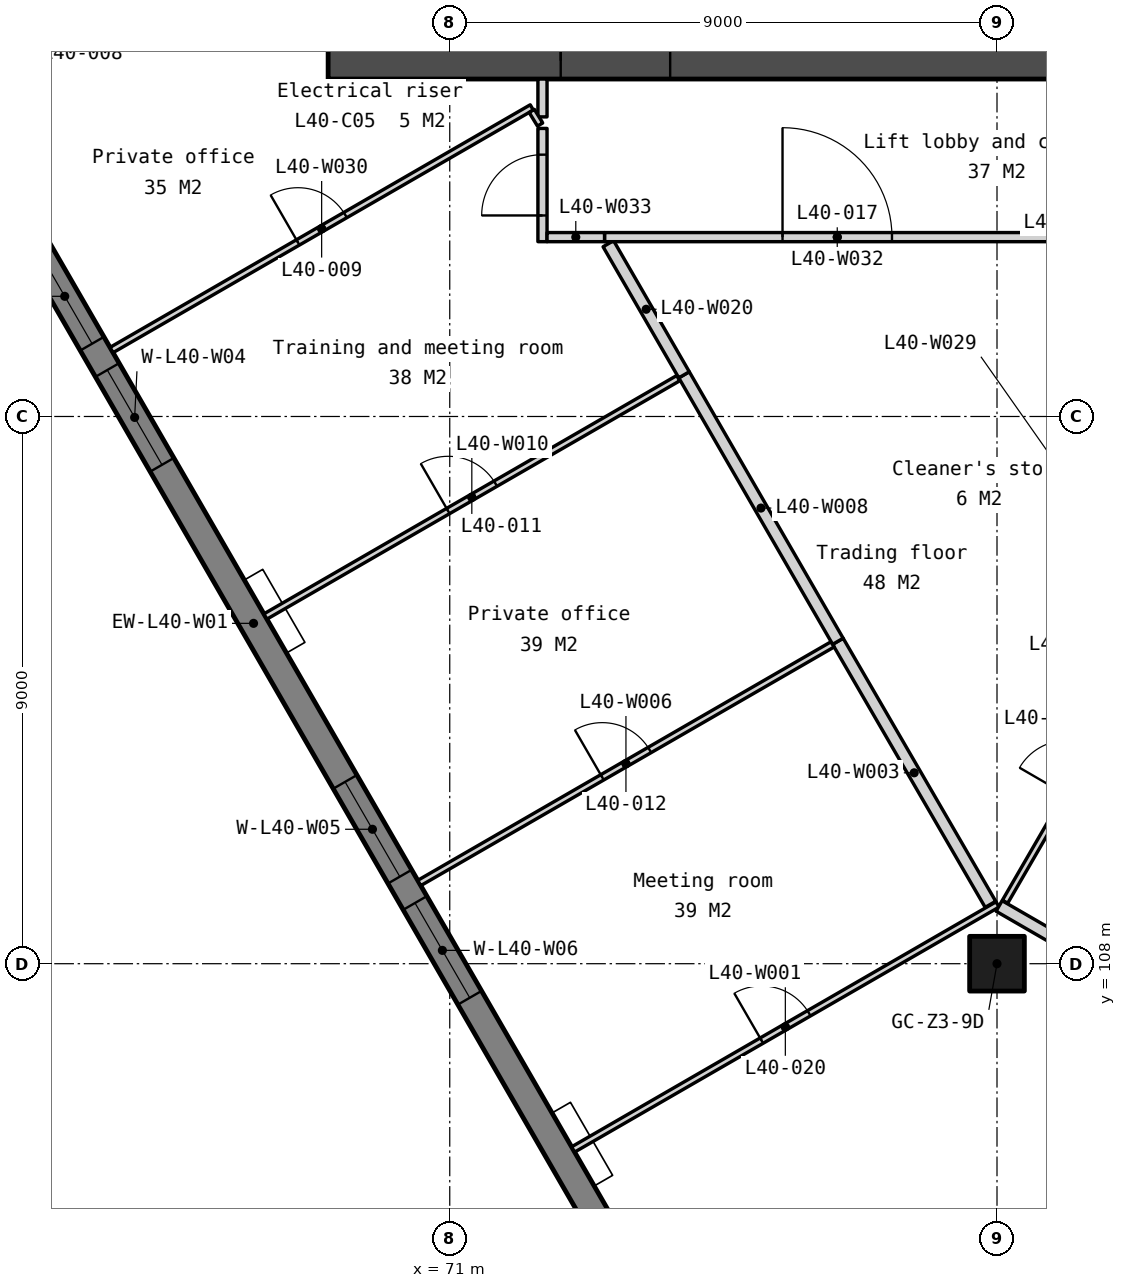
"""IFC4 building model, lengths in metres.
Left out: names, types, materials, properties, quantities, classifications, styles, units other than length and angle.
Written with IfcOpenShell. Run it as: python <this file> out.ifc"""

import sys

from ifc_helpers import new_model, si_unit, direction, frame, frame_2d, origin, origin_2d, place, context, subcontext, project, spatial, polyline, rectangle, outline, extrude, element, fill, save


model = new_model("IFC4")
c1 = context("Model", 3, precision=1e-05, world=origin(), true_north=direction((0.0, 1.0)))
c2 = subcontext(c1, "Body", "Model", "MODEL_VIEW")
j1 = project(units=[si_unit("LENGTHUNIT", "METRE"), si_unit("PLANEANGLEUNIT", "RADIAN")], contexts=[c1])
p1 = place(None, origin())
s1 = spatial("IfcSite", under=j1, at=p1, CompositionType="ELEMENT")
p2 = place(p1, origin())
s2 = spatial("IfcBuilding", under=s1, at=p2, CompositionType="ELEMENT")
p3 = place(p2, frame((0.0, 0.0, 159.8)))
s3 = spatial("IfcBuildingStorey", under=s2, at=p3, CompositionType="ELEMENT", Elevation=159.8)
p4 = place(p3, frame((80.0, 108.0, 0.0), z_axis=(0.0, 0.0, 1.0), x_axis=(1.0, 0.0, 0.0)))
e1 = element("IfcColumn", 1, at=p4, inside=s3, PredefinedType="COLUMN", context=c2, shape_type="SweptSolid", body=[
    extrude(rectangle(XDim=0.9, YDim=0.9, at=origin_2d()), origin(), (0.0, 0.0, 1.0), 3.9),
])
p5 = place(p3, frame((69.0, 122.85, 0.0), z_axis=(0.0, 0.0, 1.0), x_axis=(1.0, 0.0, 0.0)))
e2 = element("IfcWall", 2, at=p5, inside=s3, PredefinedType="SOLIDWALL", context=c2, shape_type="SweptSolid", body=[
    extrude(rectangle(XDim=22.0, YDim=0.6, at=frame_2d((11.0, 0.0))), origin(), (0.0, 0.0, 1.0), 3.75),
])
p6 = place(p5, frame((16.375, 0.0, 0.0)))
e3 = element("IfcOpeningElement", 3, at=p6, cuts=e2, PredefinedType="OPENING", context=c2, shape_type="SweptSolid", body=[
    extrude(rectangle(XDim=1.8, YDim=2.1, at=frame_2d((0.9, 1.05))), frame((0.0, 0.31, 0.0), z_axis=(0.0, -1.0, 0.0), x_axis=(1.0, 0.0, 0.0)), (0.0, 0.0, 1.0), 0.62),
])
p7 = place(p5, frame((3.825, 0.0, 0.0)))
e4 = element("IfcOpeningElement", 4, at=p7, cuts=e2, PredefinedType="OPENING", context=c2, shape_type="SweptSolid", body=[
    extrude(rectangle(XDim=1.8, YDim=2.1, at=frame_2d((0.9, 1.05))), frame((0.0, 0.31, 0.0), z_axis=(0.0, -1.0, 0.0), x_axis=(1.0, 0.0, 0.0)), (0.0, 0.0, 1.0), 0.62),
])
p8 = place(p5, frame((12.85, 0.0, 0.0)))
e5 = element("IfcOpeningElement", 5, at=p8, cuts=e2, PredefinedType="OPENING", context=c2, shape_type="SweptSolid", body=[
    extrude(rectangle(XDim=1.5, YDim=2.1, at=frame_2d((0.75, 1.05))), frame((0.0, 0.31, 0.0), z_axis=(0.0, -1.0, 0.0), x_axis=(1.0, 0.0, 0.0)), (0.0, 0.0, 1.0), 0.62),
])
p9 = place(p3, frame((57.652, 131.129, -0.15), z_axis=(0.0, 0.0, 1.0), x_axis=(0.499997369791, -0.866026922331, 0.0)))
e6 = element("IfcWall", 6, at=p9, inside=s3, PredefinedType="SOLIDWALL", context=c2, shape_type="SweptSolid", body=[
    extrude(outline(polyline([(40.486, 0.0), (40.486, 3.9), (0.0, 3.9), (0.0, 0.0), (40.486, 0.0)])), frame((0.0, 0.225, 0.0), z_axis=(0.0, -1.0, 0.0), x_axis=(1.0, 0.0, 0.0)), (0.0, 0.0, 1.0), 0.45),
])
p10 = place(p9, frame((3.011, 0.0, 0.95)))
e7 = element("IfcOpeningElement", 7, at=p10, cuts=e6, PredefinedType="OPENING", context=c2, shape_type="SweptSolid", body=[
    extrude(rectangle(XDim=1.8, YDim=2.2, at=frame_2d((0.9, 1.1))), frame((0.0, 0.235, 0.0), z_axis=(0.0, -1.0, 0.0), x_axis=(1.0, 0.0, 0.0)), (0.0, 0.0, 1.0), 0.47),
])
p11 = place(p9, frame((5.311, 0.0, 0.95)))
e8 = element("IfcOpeningElement", 8, at=p11, cuts=e6, PredefinedType="OPENING", context=c2, shape_type="SweptSolid", body=[
    extrude(rectangle(XDim=1.8, YDim=2.2, at=frame_2d((0.9, 1.1))), frame((0.0, 0.235, 0.0), z_axis=(0.0, -1.0, 0.0), x_axis=(1.0, 0.0, 0.0)), (0.0, 0.0, 1.0), 0.47),
])
p12 = place(p9, frame((13.132, 0.0, 0.95)))
e9 = element("IfcOpeningElement", 9, at=p12, cuts=e6, PredefinedType="OPENING", context=c2, shape_type="SweptSolid", body=[
    extrude(rectangle(XDim=1.8, YDim=2.2, at=frame_2d((0.9, 1.1))), frame((0.0, 0.235, 0.0), z_axis=(0.0, -1.0, 0.0), x_axis=(1.0, 0.0, 0.0)), (0.0, 0.0, 1.0), 0.47),
])
p13 = place(p9, frame((15.432, 0.0, 0.95)))
e10 = element("IfcOpeningElement", 10, at=p13, cuts=e6, PredefinedType="OPENING", context=c2, shape_type="SweptSolid", body=[
    extrude(rectangle(XDim=1.8, YDim=2.2, at=frame_2d((0.9, 1.1))), frame((0.0, 0.235, 0.0), z_axis=(0.0, -1.0, 0.0), x_axis=(1.0, 0.0, 0.0)), (0.0, 0.0, 1.0), 0.47),
])
p14 = place(p9, frame((23.254, 0.0, 0.95)))
e11 = element("IfcOpeningElement", 11, at=p14, cuts=e6, PredefinedType="OPENING", context=c2, shape_type="SweptSolid", body=[
    extrude(rectangle(XDim=1.8, YDim=2.2, at=frame_2d((0.9, 1.1))), frame((0.0, 0.235, 0.0), z_axis=(0.0, -1.0, 0.0), x_axis=(1.0, 0.0, 0.0)), (0.0, 0.0, 1.0), 0.47),
])
p15 = place(p9, frame((25.554, 0.0, 0.95)))
e12 = element("IfcOpeningElement", 12, at=p15, cuts=e6, PredefinedType="OPENING", context=c2, shape_type="SweptSolid", body=[
    extrude(rectangle(XDim=1.8, YDim=2.2, at=frame_2d((0.9, 1.1))), frame((0.0, 0.235, 0.0), z_axis=(0.0, -1.0, 0.0), x_axis=(1.0, 0.0, 0.0)), (0.0, 0.0, 1.0), 0.47),
])
p16 = place(p9, frame((33.375, 0.0, 0.95)))
e13 = element("IfcOpeningElement", 13, at=p16, cuts=e6, PredefinedType="OPENING", context=c2, shape_type="SweptSolid", body=[
    extrude(rectangle(XDim=1.8, YDim=2.2, at=frame_2d((0.9, 1.1))), frame((0.0, 0.235, 0.0), z_axis=(0.0, -1.0, 0.0), x_axis=(1.0, 0.0, 0.0)), (0.0, 0.0, 1.0), 0.47),
])
p17 = place(p9, frame((35.675, 0.0, 0.95)))
e14 = element("IfcOpeningElement", 14, at=p17, cuts=e6, PredefinedType="OPENING", context=c2, shape_type="SweptSolid", body=[
    extrude(rectangle(XDim=1.8, YDim=2.2, at=frame_2d((0.9, 1.1))), frame((0.0, 0.235, 0.0), z_axis=(0.0, -1.0, 0.0), x_axis=(1.0, 0.0, 0.0)), (0.0, 0.0, 1.0), 0.47),
])
p18 = place(p3, frame((73.029, 104.945, 0.0), z_axis=(0.0, 0.0, 1.0), x_axis=(0.866018113567, 0.500012626815, 0.0)))
e15 = element("IfcWall", 15, at=p18, inside=s3, PredefinedType="PARTITIONING", context=c2, shape_type="SweptSolid", body=[
    extrude(rectangle(XDim=8.06, YDim=0.1, at=frame_2d((4.03, 0.0))), origin(), (0.0, 0.0, 1.0), 3.75),
])
p19 = place(p18, frame((3.58, 0.0, 0.0)))
e16 = element("IfcOpeningElement", 16, at=p19, cuts=e15, PredefinedType="OPENING", context=c2, shape_type="SweptSolid", body=[
    extrude(rectangle(XDim=0.9, YDim=2.1, at=frame_2d((0.45, 1.05))), frame((0.0, 0.06, 0.0), z_axis=(0.0, -1.0, 0.0), x_axis=(1.0, 0.0, 0.0)), (0.0, 0.0, 1.0), 0.12),
])
p20 = place(p3, frame((77.384, 113.302, 0.0), z_axis=(0.0, 0.0, 1.0), x_axis=(0.501680827225, -0.865052800467, 0.0)))
e17 = element("IfcWall", 17, at=p20, inside=s3, PredefinedType="PARTITIONING", context=c2, shape_type="SweptSolid", body=[
    extrude(rectangle(XDim=5.001, YDim=0.2, at=frame_2d((2.5, 0.0))), origin(), (0.0, 0.0, 1.0), 3.75),
])
p21 = place(p3, frame((80.034, 108.95, 0.0), z_axis=(0.0, 0.0, 1.0), x_axis=(0.866028745538, -0.499994211868, 0.0)))
e18 = element("IfcWall", 18, at=p21, inside=s3, PredefinedType="PARTITIONING", context=c2, shape_type="SweptSolid", body=[
    extrude(rectangle(XDim=8.01, YDim=0.2, at=frame_2d((4.005, 0.0))), origin(), (0.0, 0.0, 1.0), 3.75),
])
p22 = place(p3, frame((70.499, 109.327, 0.0), z_axis=(0.0, 0.0, 1.0), x_axis=(0.86602399778, 0.500002435262, 0.0)))
e19 = element("IfcWall", 19, at=p22, inside=s3, PredefinedType="PARTITIONING", context=c2, shape_type="SweptSolid", body=[
    extrude(rectangle(XDim=7.85, YDim=0.1, at=frame_2d((3.925, 0.0))), origin(), (0.0, 0.0, 1.0), 3.75),
])
p23 = place(p22, frame((3.475, 0.0, 0.0)))
e20 = element("IfcOpeningElement", 20, at=p23, cuts=e19, PredefinedType="OPENING", context=c2, shape_type="SweptSolid", body=[
    extrude(rectangle(XDim=0.9, YDim=2.1, at=frame_2d((0.45, 1.05))), frame((0.0, 0.06, 0.0), z_axis=(0.0, -1.0, 0.0), x_axis=(1.0, 0.0, 0.0)), (0.0, 0.0, 1.0), 0.12),
])
p24 = place(p3, frame((74.853, 117.685, 0.0), z_axis=(0.0, 0.0, 1.0), x_axis=(0.500014760403, -0.866016881694, 0.0)))
e21 = element("IfcWall", 21, at=p24, inside=s3, PredefinedType="PARTITIONING", context=c2, shape_type="SweptSolid", body=[
    extrude(rectangle(XDim=5.061, YDim=0.2, at=frame_2d((2.53, 0.0))), origin(), (0.0, 0.0, 1.0), 3.75),
])
p25 = place(p3, frame((80.133, 109.02, 0.0), z_axis=(0.0, 0.0, 1.0), x_axis=(0.501726207978, 0.865026480651, 0.0)))
e22 = element("IfcWall", 22, at=p25, inside=s3, PredefinedType="PARTITIONING", context=c2, shape_type="SweptSolid", body=[
    extrude(rectangle(XDim=4.951, YDim=0.1, at=frame_2d((2.475, 0.0))), origin(), (0.0, 0.0, 1.0), 3.75),
])
p26 = place(p25, frame((2.025, 0.0, 0.0)))
e23 = element("IfcOpeningElement", 23, at=p26, cuts=e22, PredefinedType="OPENING", context=c2, shape_type="SweptSolid", body=[
    extrude(rectangle(XDim=0.9, YDim=2.1, at=frame_2d((0.45, 1.05))), frame((0.0, 0.06, 0.0), z_axis=(0.0, -1.0, 0.0), x_axis=(1.0, 0.0, 0.0)), (0.0, 0.0, 1.0), 0.12),
])
p27 = place(p3, frame((67.968, 113.71, 0.0), z_axis=(0.0, 0.0, 1.0), x_axis=(0.866013415921, 0.500020763015, 0.0)))
e24 = element("IfcWall", 24, at=p27, inside=s3, PredefinedType="PARTITIONING", context=c2, shape_type="SweptSolid", body=[
    extrude(rectangle(XDim=7.84, YDim=0.1, at=frame_2d((3.92, 0.0))), origin(), (0.0, 0.0, 1.0), 3.75),
])
p28 = place(p27, frame((3.47, 0.0, 0.0)))
e25 = element("IfcOpeningElement", 25, at=p28, cuts=e24, PredefinedType="OPENING", context=c2, shape_type="SweptSolid", body=[
    extrude(rectangle(XDim=0.9, YDim=2.1, at=frame_2d((0.45, 1.05))), frame((0.0, 0.06, 0.0), z_axis=(0.0, -1.0, 0.0), x_axis=(1.0, 0.0, 0.0)), (0.0, 0.0, 1.0), 0.12),
])
p29 = place(p3, frame((73.608, 119.842, 0.0), z_axis=(0.0, 0.0, 1.0), x_axis=(0.50001949124, -0.86601415022, 0.0)))
e26 = element("IfcWall", 26, at=p29, inside=s3, PredefinedType="PARTITIONING", context=c2, shape_type="SweptSolid", body=[
    extrude(rectangle(XDim=2.49, YDim=0.2, at=frame_2d((1.245, 0.0))), origin(), (0.0, 0.0, 1.0), 3.75),
])
p30 = place(p3, frame((65.438, 118.093, 0.0), z_axis=(0.0, 0.0, 1.0), x_axis=(0.866026120082, 0.499998759335, 0.0)))
e27 = element("IfcWall", 27, at=p30, inside=s3, PredefinedType="PARTITIONING", context=c2, shape_type="SweptSolid", body=[
    extrude(rectangle(XDim=7.98, YDim=0.1, at=frame_2d((3.99, 0.0))), origin(), (0.0, 0.0, 1.0), 3.75),
])
p31 = place(p30, frame((3.54, 0.0, 0.0)))
e28 = element("IfcOpeningElement", 28, at=p31, cuts=e27, PredefinedType="OPENING", context=c2, shape_type="SweptSolid", body=[
    extrude(rectangle(XDim=0.9, YDim=2.1, at=frame_2d((0.45, 1.05))), frame((0.0, 0.06, 0.0), z_axis=(0.0, -1.0, 0.0), x_axis=(1.0, 0.0, 0.0)), (0.0, 0.0, 1.0), 0.12),
])
p32 = place(p3, frame((72.525, 119.875, 0.0), z_axis=(0.0, 0.0, 1.0), x_axis=(0.0, 1.0, 0.0)))
e29 = element("IfcWall", 29, at=p32, inside=s3, PredefinedType="PARTITIONING", context=c2, shape_type="SweptSolid", body=[
    extrude(rectangle(XDim=1.863, YDim=0.15, at=frame_2d((0.931, 0.0))), origin(), (0.0, 0.0, 1.0), 3.75),
])
p33 = place(p32, frame((0.431, 0.0, 0.0)))
e30 = element("IfcOpeningElement", 30, at=p33, cuts=e29, PredefinedType="OPENING", context=c2, shape_type="SweptSolid", body=[
    extrude(rectangle(XDim=1.0, YDim=2.1, at=frame_2d((0.5, 1.05))), frame((0.0, 0.085, 0.0), z_axis=(0.0, -1.0, 0.0), x_axis=(1.0, 0.0, 0.0)), (0.0, 0.0, 1.0), 0.17),
])
p34 = place(p3, frame((73.545, 119.95, 0.0), z_axis=(0.0, 0.0, 1.0), x_axis=(1.0, 0.0, 0.0)))
e31 = element("IfcWall", 31, at=p34, inside=s3, PredefinedType="PARTITIONING", context=c2, shape_type="SweptSolid", body=[
    extrude(rectangle(XDim=7.655, YDim=0.15, at=frame_2d((3.827, 0.0))), origin(), (0.0, 0.0, 1.0), 3.75),
])
p35 = place(p34, frame((2.927, 0.0, 0.0)))
e32 = element("IfcOpeningElement", 32, at=p35, cuts=e31, PredefinedType="OPENING", context=c2, shape_type="SweptSolid", body=[
    extrude(rectangle(XDim=1.8, YDim=2.1, at=frame_2d((0.9, 1.05))), frame((0.0, 0.085, 0.0), z_axis=(0.0, -1.0, 0.0), x_axis=(1.0, 0.0, 0.0)), (0.0, 0.0, 1.0), 0.17),
])
p36 = place(p3, frame((72.6, 119.95, 0.0), z_axis=(0.0, 0.0, 1.0), x_axis=(1.0, 0.0, 0.0)))
e33 = element("IfcWall", 33, at=p36, inside=s3, PredefinedType="PARTITIONING", context=c2, shape_type="SweptSolid", body=[
    extrude(rectangle(XDim=0.945, YDim=0.15, at=frame_2d((0.473, 0.0))), origin(), (0.0, 0.0, 1.0), 3.75),
])
p37 = place(p3, frame((72.525, 121.927, 0.0), z_axis=(0.0, 0.0, 1.0), x_axis=(0.0, 1.0, 0.0)))
e34 = element("IfcWall", 34, at=p37, inside=s3, PredefinedType="PARTITIONING", context=c2, shape_type="SweptSolid", body=[
    extrude(rectangle(XDim=0.623, YDim=0.15, at=frame_2d((0.311, 0.0))), origin(), (0.0, 0.0, 1.0), 3.75),
])
p38 = place(p3, frame((72.349, 122.025, 0.0), z_axis=(0.0, 0.0, 1.0), x_axis=(0.521863852021, -0.853028791984, 0.0)))
e35 = element("IfcWall", 35, at=p38, inside=s3, PredefinedType="PARTITIONING", context=c2, shape_type="SweptSolid", body=[
    extrude(rectangle(XDim=0.262, YDim=0.1, at=frame_2d((0.131, 0.0))), origin(), (0.0, 0.0, 1.0), 3.75),
])
p39 = place(p3, frame((62.907, 122.476, 0.0), z_axis=(0.0, 0.0, 1.0), x_axis=(0.866028145587, 0.499995251029, 0.0)))
e36 = element("IfcWall", 36, at=p39, inside=s3, PredefinedType="PARTITIONING", context=c2, shape_type="SweptSolid", body=[
    extrude(rectangle(XDim=4.726, YDim=0.1, at=frame_2d((2.363, 0.0))), origin(), (0.0, 0.0, 1.0), 3.75),
])
p40 = place(p39, frame((1.913, 0.0, 0.0)))
e37 = element("IfcOpeningElement", 37, at=p40, cuts=e36, PredefinedType="OPENING", context=c2, shape_type="SweptSolid", body=[
    extrude(rectangle(XDim=0.9, YDim=2.1, at=frame_2d((0.45, 1.05))), frame((0.0, 0.06, 0.0), z_axis=(0.0, -1.0, 0.0), x_axis=(1.0, 0.0, 0.0)), (0.0, 0.0, 1.0), 0.12),
])
p41 = place(p7, origin())
e38 = element("IfcDoor", 38, at=p41, inside=s3, OperationType="DOUBLE_DOOR_DOUBLE_SWING", PredefinedType="DOOR", context=c2, shape_type="SweptSolid", body=[
    extrude(rectangle(XDim=1.8, YDim=2.1, at=frame_2d((0.9, 1.05))), frame((0.0, 0.025, 0.0), z_axis=(0.0, -1.0, 0.0), x_axis=(1.0, 0.0, 0.0)), (0.0, 0.0, 1.0), 0.05),
])
fill(e4, e38)
p42 = place(p12, origin())
e39 = element("IfcWindow", 39, at=p42, inside=s3, PartitioningType="SINGLE_PANEL", PredefinedType="WINDOW", context=c2, shape_type="SweptSolid", body=[
    extrude(rectangle(XDim=1.8, YDim=2.2, at=frame_2d((0.9, 1.1))), frame((0.0, 0.03, 0.0), z_axis=(0.0, -1.0, 0.0), x_axis=(1.0, 0.0, 0.0)), (0.0, 0.0, 1.0), 0.06),
])
fill(e9, e39)
p43 = place(p13, origin())
e40 = element("IfcWindow", 40, at=p43, inside=s3, PartitioningType="SINGLE_PANEL", PredefinedType="WINDOW", context=c2, shape_type="SweptSolid", body=[
    extrude(rectangle(XDim=1.8, YDim=2.2, at=frame_2d((0.9, 1.1))), frame((0.0, 0.03, 0.0), z_axis=(0.0, -1.0, 0.0), x_axis=(1.0, 0.0, 0.0)), (0.0, 0.0, 1.0), 0.06),
])
fill(e10, e40)
p44 = place(p14, origin())
e41 = element("IfcWindow", 41, at=p44, inside=s3, PartitioningType="SINGLE_PANEL", PredefinedType="WINDOW", context=c2, shape_type="SweptSolid", body=[
    extrude(rectangle(XDim=1.8, YDim=2.2, at=frame_2d((0.9, 1.1))), frame((0.0, 0.03, 0.0), z_axis=(0.0, -1.0, 0.0), x_axis=(1.0, 0.0, 0.0)), (0.0, 0.0, 1.0), 0.06),
])
fill(e11, e41)
p45 = place(p15, origin())
e42 = element("IfcWindow", 42, at=p45, inside=s3, PartitioningType="SINGLE_PANEL", PredefinedType="WINDOW", context=c2, shape_type="SweptSolid", body=[
    extrude(rectangle(XDim=1.8, YDim=2.2, at=frame_2d((0.9, 1.1))), frame((0.0, 0.03, 0.0), z_axis=(0.0, -1.0, 0.0), x_axis=(1.0, 0.0, 0.0)), (0.0, 0.0, 1.0), 0.06),
])
fill(e12, e42)
p46 = place(p31, origin())
e43 = element("IfcDoor", 43, at=p46, inside=s3, OperationType="SINGLE_SWING_LEFT", PredefinedType="DOOR", context=c2, shape_type="SweptSolid", body=[
    extrude(rectangle(XDim=0.9, YDim=2.1, at=frame_2d((0.45, 1.05))), frame((0.0, 0.025, 0.0), z_axis=(0.0, -1.0, 0.0), x_axis=(1.0, 0.0, 0.0)), (0.0, 0.0, 1.0), 0.05),
])
fill(e28, e43)
p47 = place(p33, origin())
e44 = element("IfcDoor", 44, at=p47, inside=s3, OperationType="SINGLE_SWING_LEFT", PredefinedType="DOOR", context=c2, shape_type="SweptSolid", body=[
    extrude(rectangle(XDim=1.0, YDim=2.1, at=frame_2d((0.5, 1.05))), frame((0.0, 0.025, 0.0), z_axis=(0.0, -1.0, 0.0), x_axis=(1.0, 0.0, 0.0)), (0.0, 0.0, 1.0), 0.05),
])
fill(e30, e44)
p48 = place(p28, origin())
e45 = element("IfcDoor", 45, at=p48, inside=s3, OperationType="SINGLE_SWING_LEFT", PredefinedType="DOOR", context=c2, shape_type="SweptSolid", body=[
    extrude(rectangle(XDim=0.9, YDim=2.1, at=frame_2d((0.45, 1.05))), frame((0.0, 0.025, 0.0), z_axis=(0.0, -1.0, 0.0), x_axis=(1.0, 0.0, 0.0)), (0.0, 0.0, 1.0), 0.05),
])
fill(e25, e45)
p49 = place(p23, origin())
e46 = element("IfcDoor", 46, at=p49, inside=s3, OperationType="SINGLE_SWING_LEFT", PredefinedType="DOOR", context=c2, shape_type="SweptSolid", body=[
    extrude(rectangle(XDim=0.9, YDim=2.1, at=frame_2d((0.45, 1.05))), frame((0.0, 0.025, 0.0), z_axis=(0.0, -1.0, 0.0), x_axis=(1.0, 0.0, 0.0)), (0.0, 0.0, 1.0), 0.05),
])
fill(e20, e46)
p50 = place(p35, origin())
e47 = element("IfcDoor", 47, at=p50, inside=s3, OperationType="SINGLE_SWING_LEFT", PredefinedType="DOOR", context=c2, shape_type="SweptSolid", body=[
    extrude(rectangle(XDim=1.8, YDim=2.1, at=frame_2d((0.9, 1.05))), frame((0.0, 0.025, 0.0), z_axis=(0.0, -1.0, 0.0), x_axis=(1.0, 0.0, 0.0)), (0.0, 0.0, 1.0), 0.05),
])
fill(e32, e47)
p51 = place(p19, origin())
e48 = element("IfcDoor", 48, at=p51, inside=s3, OperationType="SINGLE_SWING_LEFT", PredefinedType="DOOR", context=c2, shape_type="SweptSolid", body=[
    extrude(rectangle(XDim=0.9, YDim=2.1, at=frame_2d((0.45, 1.05))), frame((0.0, 0.025, 0.0), z_axis=(0.0, -1.0, 0.0), x_axis=(1.0, 0.0, 0.0)), (0.0, 0.0, 1.0), 0.05),
])
fill(e16, e48)
save(model, sys.argv[1])
